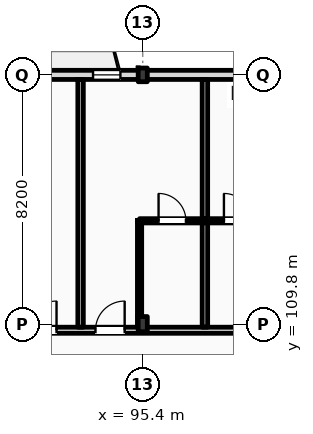
"""IFC4 building model, lengths in metres.
Left out: names, types, materials, properties, quantities, classifications, styles, units other than length and angle.
Written with IfcOpenShell. Run it as: python <this file> out.ifc"""

import sys

from ifc_helpers import new_model, si_unit, direction, frame, frame_2d, origin, origin_2d, place, context, subcontext, project, spatial, rectangle, i_section, extrude, element, fill, save


model = new_model("IFC4")
c1 = context("Model", 3, precision=1e-05, world=origin(), true_north=direction((0.0, 1.0)))
c2 = subcontext(c1, "Body", "Model", "MODEL_VIEW")
j1 = project(units=[si_unit("LENGTHUNIT", "METRE"), si_unit("PLANEANGLEUNIT", "RADIAN")], contexts=[c1])
p1 = place(None, origin())
s1 = spatial("IfcSite", under=j1, at=p1, CompositionType="ELEMENT")
p2 = place(p1, origin())
s2 = spatial("IfcBuilding", under=s1, at=p2, CompositionType="ELEMENT")
p3 = place(p2, frame((0.0, 0.0, 28.2)))
s3 = spatial("IfcBuildingStorey", under=s2, at=p3, CompositionType="ELEMENT", Elevation=28.2)
p4 = place(p3, frame((95.4, 109.8, 0.0), z_axis=(0.0, 0.0, 1.0), x_axis=(1.0, 0.0, 0.0)))
e1 = element("IfcColumn", 1, at=p4, inside=s3, PredefinedType="COLUMN", context=c2, shape_type="SweptSolid", body=[
    extrude(i_section(OverallWidth=0.3, OverallDepth=0.5, WebThickness=0.014, FlangeThickness=0.028, FilletRadius=0.027, at=origin_2d()), origin(), (0.0, 0.0, 1.0), 3.6),
])
p5 = place(p3, frame((95.4, 118.0, 0.0), z_axis=(0.0, 0.0, 1.0), x_axis=(1.0, 0.0, 0.0)))
e2 = element("IfcColumn", 2, at=p5, inside=s3, PredefinedType="COLUMN", context=c2, shape_type="SweptSolid", body=[
    extrude(i_section(OverallWidth=0.3, OverallDepth=0.45, WebThickness=0.014, FlangeThickness=0.026, FilletRadius=0.027, at=origin_2d()), origin(), (0.0, 0.0, 1.0), 3.6),
])
p6 = place(p3, frame((22.5, 118.0, 0.0), z_axis=(0.0, 0.0, 1.0), x_axis=(1.0, 0.0, 0.0)))
e3 = element("IfcWall", 3, at=p6, inside=s3, PredefinedType="STANDARD", context=c2, shape_type="SweptSolid", body=[
    extrude(rectangle(XDim=97.5, YDim=0.3, at=frame_2d((48.75, 0.0))), origin(), (0.0, 0.0, 1.0), 2.8),
])
p7 = place(p6, frame((0.91, 0.0, 0.9)))
e4 = element("IfcOpeningElement", 4, at=p7, cuts=e3, PredefinedType="OPENING", context=c2, shape_type="SweptSolid", body=[
    extrude(rectangle(XDim=0.9, YDim=1.72, at=frame_2d((0.45, 0.86))), frame((0.0, 0.16, 0.0), z_axis=(0.0, -1.0, 0.0), x_axis=(1.0, 0.0, 0.0)), (0.0, 0.0, 1.0), 0.32),
])
p8 = place(p6, frame((6.561, 0.0, 0.0)))
e5 = element("IfcOpeningElement", 5, at=p8, cuts=e3, PredefinedType="OPENING", context=c2, shape_type="SweptSolid", body=[
    extrude(rectangle(XDim=1.2, YDim=2.25, at=frame_2d((0.6, 1.125))), frame((0.0, 0.16, 0.0), z_axis=(0.0, -1.0, 0.0), x_axis=(1.0, 0.0, 0.0)), (0.0, 0.0, 1.0), 0.32),
])
p9 = place(p6, frame((11.477, 0.0, 0.9)))
e6 = element("IfcOpeningElement", 6, at=p9, cuts=e3, PredefinedType="OPENING", context=c2, shape_type="SweptSolid", body=[
    extrude(rectangle(XDim=1.1, YDim=1.5, at=frame_2d((0.55, 0.75))), frame((0.0, 0.16, 0.0), z_axis=(0.0, -1.0, 0.0), x_axis=(1.0, 0.0, 0.0)), (0.0, 0.0, 1.0), 0.32),
])
p10 = place(p6, frame((15.194, 0.0, 0.9)))
e7 = element("IfcOpeningElement", 7, at=p10, cuts=e3, PredefinedType="OPENING", context=c2, shape_type="SweptSolid", body=[
    extrude(rectangle(XDim=1.25, YDim=1.6, at=frame_2d((0.625, 0.8))), frame((0.0, 0.16, 0.0), z_axis=(0.0, -1.0, 0.0), x_axis=(1.0, 0.0, 0.0)), (0.0, 0.0, 1.0), 0.32),
])
p11 = place(p6, frame((19.509, 0.0, 0.9)))
e8 = element("IfcOpeningElement", 8, at=p11, cuts=e3, PredefinedType="OPENING", context=c2, shape_type="SweptSolid", body=[
    extrude(rectangle(XDim=1.4, YDim=1.7, at=frame_2d((0.7, 0.85))), frame((0.0, 0.16, 0.0), z_axis=(0.0, -1.0, 0.0), x_axis=(1.0, 0.0, 0.0)), (0.0, 0.0, 1.0), 0.32),
])
p12 = place(p6, frame((23.258, 0.0, 0.0)))
e9 = element("IfcOpeningElement", 9, at=p12, cuts=e3, PredefinedType="OPENING", context=c2, shape_type="SweptSolid", body=[
    extrude(rectangle(XDim=1.2, YDim=2.25, at=frame_2d((0.6, 1.125))), frame((0.0, 0.16, 0.0), z_axis=(0.0, -1.0, 0.0), x_axis=(1.0, 0.0, 0.0)), (0.0, 0.0, 1.0), 0.32),
])
p13 = place(p6, frame((28.115, 0.0, 0.9)))
e10 = element("IfcOpeningElement", 10, at=p13, cuts=e3, PredefinedType="OPENING", context=c2, shape_type="SweptSolid", body=[
    extrude(rectangle(XDim=1.75, YDim=1.72, at=frame_2d((0.875, 0.86))), frame((0.0, 0.16, 0.0), z_axis=(0.0, -1.0, 0.0), x_axis=(1.0, 0.0, 0.0)), (0.0, 0.0, 1.0), 0.32),
])
p14 = place(p6, frame((31.582, 0.0, 0.9)))
e11 = element("IfcOpeningElement", 11, at=p14, cuts=e3, PredefinedType="OPENING", context=c2, shape_type="SweptSolid", body=[
    extrude(rectangle(XDim=1.35, YDim=1.72, at=frame_2d((0.675, 0.86))), frame((0.0, 0.16, 0.0), z_axis=(0.0, -1.0, 0.0), x_axis=(1.0, 0.0, 0.0)), (0.0, 0.0, 1.0), 0.32),
])
p15 = place(p6, frame((37.379, 0.0, 0.0)))
e12 = element("IfcOpeningElement", 12, at=p15, cuts=e3, PredefinedType="OPENING", context=c2, shape_type="SweptSolid", body=[
    extrude(rectangle(XDim=1.2, YDim=2.25, at=frame_2d((0.6, 1.125))), frame((0.0, 0.16, 0.0), z_axis=(0.0, -1.0, 0.0), x_axis=(1.0, 0.0, 0.0)), (0.0, 0.0, 1.0), 0.32),
])
p16 = place(p6, frame((42.663, 0.0, 0.9)))
e13 = element("IfcOpeningElement", 13, at=p16, cuts=e3, PredefinedType="OPENING", context=c2, shape_type="SweptSolid", body=[
    extrude(rectangle(XDim=1.35, YDim=1.72, at=frame_2d((0.675, 0.86))), frame((0.0, 0.16, 0.0), z_axis=(0.0, -1.0, 0.0), x_axis=(1.0, 0.0, 0.0)), (0.0, 0.0, 1.0), 0.32),
])
p17 = place(p6, frame((45.119, 0.0, 0.9)))
e14 = element("IfcOpeningElement", 14, at=p17, cuts=e3, PredefinedType="OPENING", context=c2, shape_type="SweptSolid", body=[
    extrude(rectangle(XDim=2.871, YDim=1.72, at=frame_2d((1.436, 0.86))), frame((0.0, 0.16, 0.0), z_axis=(0.0, -1.0, 0.0), x_axis=(1.0, 0.0, 0.0)), (0.0, 0.0, 1.0), 0.32),
])
p18 = place(p6, frame((50.41, 0.0, 0.9)))
e15 = element("IfcOpeningElement", 15, at=p18, cuts=e3, PredefinedType="OPENING", context=c2, shape_type="SweptSolid", body=[
    extrude(rectangle(XDim=1.8, YDim=1.72, at=frame_2d((0.9, 0.86))), frame((0.0, 0.16, 0.0), z_axis=(0.0, -1.0, 0.0), x_axis=(1.0, 0.0, 0.0)), (0.0, 0.0, 1.0), 0.32),
])
p19 = place(p6, frame((54.375, 0.0, 0.0)))
e16 = element("IfcOpeningElement", 16, at=p19, cuts=e3, PredefinedType="OPENING", context=c2, shape_type="SweptSolid", body=[
    extrude(rectangle(XDim=1.2, YDim=2.25, at=frame_2d((0.6, 1.125))), frame((0.0, 0.16, 0.0), z_axis=(0.0, -1.0, 0.0), x_axis=(1.0, 0.0, 0.0)), (0.0, 0.0, 1.0), 0.32),
])
p20 = place(p6, frame((59.052, 0.0, 0.9)))
e17 = element("IfcOpeningElement", 17, at=p20, cuts=e3, PredefinedType="OPENING", context=c2, shape_type="SweptSolid", body=[
    extrude(rectangle(XDim=1.35, YDim=1.72, at=frame_2d((0.675, 0.86))), frame((0.0, 0.16, 0.0), z_axis=(0.0, -1.0, 0.0), x_axis=(1.0, 0.0, 0.0)), (0.0, 0.0, 1.0), 0.32),
])
p21 = place(p6, frame((62.768, 0.0, 0.9)))
e18 = element("IfcOpeningElement", 18, at=p21, cuts=e3, PredefinedType="OPENING", context=c2, shape_type="SweptSolid", body=[
    extrude(rectangle(XDim=1.5, YDim=1.72, at=frame_2d((0.75, 0.86))), frame((0.0, 0.16, 0.0), z_axis=(0.0, -1.0, 0.0), x_axis=(1.0, 0.0, 0.0)), (0.0, 0.0, 1.0), 0.32),
])
p22 = place(p6, frame((68.498, 0.0, 0.0)))
e19 = element("IfcOpeningElement", 19, at=p22, cuts=e3, PredefinedType="OPENING", context=c2, shape_type="SweptSolid", body=[
    extrude(rectangle(XDim=1.2, YDim=2.25, at=frame_2d((0.6, 1.125))), frame((0.0, 0.16, 0.0), z_axis=(0.0, -1.0, 0.0), x_axis=(1.0, 0.0, 0.0)), (0.0, 0.0, 1.0), 0.32),
])
p23 = place(p6, frame((71.265, 0.0, 0.9)))
e20 = element("IfcOpeningElement", 20, at=p23, cuts=e3, PredefinedType="OPENING", context=c2, shape_type="SweptSolid", body=[
    extrude(rectangle(XDim=0.9, YDim=1.72, at=frame_2d((0.45, 0.86))), frame((0.0, 0.16, 0.0), z_axis=(0.0, -1.0, 0.0), x_axis=(1.0, 0.0, 0.0)), (0.0, 0.0, 1.0), 0.32),
])
p24 = place(p6, frame((76.316, 0.0, 0.9)))
e21 = element("IfcOpeningElement", 21, at=p24, cuts=e3, PredefinedType="OPENING", context=c2, shape_type="SweptSolid", body=[
    extrude(rectangle(XDim=1.95, YDim=1.72, at=frame_2d((0.975, 0.86))), frame((0.0, 0.16, 0.0), z_axis=(0.0, -1.0, 0.0), x_axis=(1.0, 0.0, 0.0)), (0.0, 0.0, 1.0), 0.32),
])
p25 = place(p6, frame((81.632, 0.0, 0.9)))
e22 = element("IfcOpeningElement", 22, at=p25, cuts=e3, PredefinedType="OPENING", context=c2, shape_type="SweptSolid", body=[
    extrude(rectangle(XDim=1.35, YDim=1.72, at=frame_2d((0.675, 0.86))), frame((0.0, 0.16, 0.0), z_axis=(0.0, -1.0, 0.0), x_axis=(1.0, 0.0, 0.0)), (0.0, 0.0, 1.0), 0.32),
])
p26 = place(p6, frame((84.948, 0.0, 0.9)))
e23 = element("IfcOpeningElement", 23, at=p26, cuts=e3, PredefinedType="OPENING", context=c2, shape_type="SweptSolid", body=[
    extrude(rectangle(XDim=2.25, YDim=1.72, at=frame_2d((1.125, 0.86))), frame((0.0, 0.16, 0.0), z_axis=(0.0, -1.0, 0.0), x_axis=(1.0, 0.0, 0.0)), (0.0, 0.0, 1.0), 0.32),
])
p27 = place(p6, frame((90.063, 0.0, 0.9)))
e24 = element("IfcOpeningElement", 24, at=p27, cuts=e3, PredefinedType="OPENING", context=c2, shape_type="SweptSolid", body=[
    extrude(rectangle(XDim=1.8, YDim=1.72, at=frame_2d((0.9, 0.86))), frame((0.0, 0.16, 0.0), z_axis=(0.0, -1.0, 0.0), x_axis=(1.0, 0.0, 0.0)), (0.0, 0.0, 1.0), 0.32),
])
p28 = place(p6, frame((93.529, 0.0, 0.9)))
e25 = element("IfcOpeningElement", 25, at=p28, cuts=e3, PredefinedType="OPENING", context=c2, shape_type="SweptSolid", body=[
    extrude(rectangle(XDim=2.55, YDim=1.72, at=frame_2d((1.275, 0.86))), frame((0.0, 0.16, 0.0), z_axis=(0.0, -1.0, 0.0), x_axis=(1.0, 0.0, 0.0)), (0.0, 0.0, 1.0), 0.32),
])
p29 = place(p3, frame((10.65, 109.6, 0.0), z_axis=(0.0, 0.0, 1.0), x_axis=(1.0, 0.0, 0.0)))
e26 = element("IfcWall", 26, at=p29, inside=s3, PredefinedType="PARTITIONING", context=c2, shape_type="SweptSolid", body=[
    extrude(rectangle(XDim=109.21, YDim=0.2, at=frame_2d((54.605, 0.0))), origin(), (0.0, 0.0, 1.0), 2.8),
])
p30 = place(p29, frame((12.611, 0.0, 0.0)))
e27 = element("IfcOpeningElement", 27, at=p30, cuts=e26, PredefinedType="OPENING", context=c2, shape_type="SweptSolid", body=[
    extrude(rectangle(XDim=1.02, YDim=2.2, at=frame_2d((0.51, 1.1))), frame((0.0, 0.11, 0.0), z_axis=(0.0, -1.0, 0.0), x_axis=(1.0, 0.0, 0.0)), (0.0, 0.0, 1.0), 0.22),
])
p31 = place(p29, frame((19.451, 0.0, 0.0)))
e28 = element("IfcOpeningElement", 28, at=p31, cuts=e26, PredefinedType="OPENING", context=c2, shape_type="SweptSolid", body=[
    extrude(rectangle(XDim=1.02, YDim=2.2, at=frame_2d((0.51, 1.1))), frame((0.0, 0.11, 0.0), z_axis=(0.0, -1.0, 0.0), x_axis=(1.0, 0.0, 0.0)), (0.0, 0.0, 1.0), 0.22),
])
p32 = place(p29, frame((23.842, 0.0, 0.0)))
e29 = element("IfcOpeningElement", 29, at=p32, cuts=e26, PredefinedType="OPENING", context=c2, shape_type="SweptSolid", body=[
    extrude(rectangle(XDim=1.02, YDim=2.2, at=frame_2d((0.51, 1.1))), frame((0.0, 0.11, 0.0), z_axis=(0.0, -1.0, 0.0), x_axis=(1.0, 0.0, 0.0)), (0.0, 0.0, 1.0), 0.22),
])
p33 = place(p29, frame((26.084, 0.0, 0.0)))
e30 = element("IfcOpeningElement", 30, at=p33, cuts=e26, PredefinedType="OPENING", context=c2, shape_type="SweptSolid", body=[
    extrude(rectangle(XDim=1.02, YDim=2.2, at=frame_2d((0.51, 1.1))), frame((0.0, 0.11, 0.0), z_axis=(0.0, -1.0, 0.0), x_axis=(1.0, 0.0, 0.0)), (0.0, 0.0, 1.0), 0.22),
])
p34 = place(p29, frame((32.655, 0.0, 0.0)))
e31 = element("IfcOpeningElement", 31, at=p34, cuts=e26, PredefinedType="OPENING", context=c2, shape_type="SweptSolid", body=[
    extrude(rectangle(XDim=0.96, YDim=2.2, at=frame_2d((0.48, 1.1))), frame((0.0, 0.11, 0.0), z_axis=(0.0, -1.0, 0.0), x_axis=(1.0, 0.0, 0.0)), (0.0, 0.0, 1.0), 0.22),
])
p35 = place(p29, frame((34.895, 0.0, 0.0)))
e32 = element("IfcOpeningElement", 32, at=p35, cuts=e26, PredefinedType="OPENING", context=c2, shape_type="SweptSolid", body=[
    extrude(rectangle(XDim=0.96, YDim=2.2, at=frame_2d((0.48, 1.1))), frame((0.0, 0.11, 0.0), z_axis=(0.0, -1.0, 0.0), x_axis=(1.0, 0.0, 0.0)), (0.0, 0.0, 1.0), 0.22),
])
p36 = place(p29, frame((41.436, 0.0, 0.0)))
e33 = element("IfcOpeningElement", 33, at=p36, cuts=e26, PredefinedType="OPENING", context=c2, shape_type="SweptSolid", body=[
    extrude(rectangle(XDim=0.96, YDim=2.2, at=frame_2d((0.48, 1.1))), frame((0.0, 0.11, 0.0), z_axis=(0.0, -1.0, 0.0), x_axis=(1.0, 0.0, 0.0)), (0.0, 0.0, 1.0), 0.22),
])
p37 = place(p29, frame((43.427, 0.0, 0.0)))
e34 = element("IfcOpeningElement", 34, at=p37, cuts=e26, PredefinedType="OPENING", context=c2, shape_type="SweptSolid", body=[
    extrude(rectangle(XDim=0.96, YDim=2.2, at=frame_2d((0.48, 1.1))), frame((0.0, 0.11, 0.0), z_axis=(0.0, -1.0, 0.0), x_axis=(1.0, 0.0, 0.0)), (0.0, 0.0, 1.0), 0.22),
])
p38 = place(p29, frame((50.218, 0.0, 0.0)))
e35 = element("IfcOpeningElement", 35, at=p38, cuts=e26, PredefinedType="OPENING", context=c2, shape_type="SweptSolid", body=[
    extrude(rectangle(XDim=0.96, YDim=2.2, at=frame_2d((0.48, 1.1))), frame((0.0, 0.11, 0.0), z_axis=(0.0, -1.0, 0.0), x_axis=(1.0, 0.0, 0.0)), (0.0, 0.0, 1.0), 0.22),
])
p39 = place(p29, frame((54.859, 0.0, 0.0)))
e36 = element("IfcOpeningElement", 36, at=p39, cuts=e26, PredefinedType="OPENING", context=c2, shape_type="SweptSolid", body=[
    extrude(rectangle(XDim=0.96, YDim=2.2, at=frame_2d((0.48, 1.1))), frame((0.0, 0.11, 0.0), z_axis=(0.0, -1.0, 0.0), x_axis=(1.0, 0.0, 0.0)), (0.0, 0.0, 1.0), 0.22),
])
p40 = place(p29, frame((59.0, 0.0, 0.0)))
e37 = element("IfcOpeningElement", 37, at=p40, cuts=e26, PredefinedType="OPENING", context=c2, shape_type="SweptSolid", body=[
    extrude(rectangle(XDim=0.96, YDim=2.2, at=frame_2d((0.48, 1.1))), frame((0.0, 0.11, 0.0), z_axis=(0.0, -1.0, 0.0), x_axis=(1.0, 0.0, 0.0)), (0.0, 0.0, 1.0), 0.22),
])
p41 = place(p29, frame((63.39, 0.0, 0.0)))
e38 = element("IfcOpeningElement", 38, at=p41, cuts=e26, PredefinedType="OPENING", context=c2, shape_type="SweptSolid", body=[
    extrude(rectangle(XDim=0.96, YDim=2.2, at=frame_2d((0.48, 1.1))), frame((0.0, 0.11, 0.0), z_axis=(0.0, -1.0, 0.0), x_axis=(1.0, 0.0, 0.0)), (0.0, 0.0, 1.0), 0.22),
])
p42 = place(p29, frame((65.631, 0.0, 0.0)))
e39 = element("IfcOpeningElement", 39, at=p42, cuts=e26, PredefinedType="OPENING", context=c2, shape_type="SweptSolid", body=[
    extrude(rectangle(XDim=0.96, YDim=2.2, at=frame_2d((0.48, 1.1))), frame((0.0, 0.11, 0.0), z_axis=(0.0, -1.0, 0.0), x_axis=(1.0, 0.0, 0.0)), (0.0, 0.0, 1.0), 0.22),
])
p43 = place(p29, frame((72.172, 0.0, 0.0)))
e40 = element("IfcOpeningElement", 40, at=p43, cuts=e26, PredefinedType="OPENING", context=c2, shape_type="SweptSolid", body=[
    extrude(rectangle(XDim=0.96, YDim=2.2, at=frame_2d((0.48, 1.1))), frame((0.0, 0.11, 0.0), z_axis=(0.0, -1.0, 0.0), x_axis=(1.0, 0.0, 0.0)), (0.0, 0.0, 1.0), 0.22),
])
p44 = place(p29, frame((74.413, 0.0, 0.0)))
e41 = element("IfcOpeningElement", 41, at=p44, cuts=e26, PredefinedType="OPENING", context=c2, shape_type="SweptSolid", body=[
    extrude(rectangle(XDim=0.96, YDim=2.2, at=frame_2d((0.48, 1.1))), frame((0.0, 0.11, 0.0), z_axis=(0.0, -1.0, 0.0), x_axis=(1.0, 0.0, 0.0)), (0.0, 0.0, 1.0), 0.22),
])
p45 = place(p29, frame((80.954, 0.0, 0.0)))
e42 = element("IfcOpeningElement", 42, at=p45, cuts=e26, PredefinedType="OPENING", context=c2, shape_type="SweptSolid", body=[
    extrude(rectangle(XDim=0.96, YDim=2.2, at=frame_2d((0.48, 1.1))), frame((0.0, 0.11, 0.0), z_axis=(0.0, -1.0, 0.0), x_axis=(1.0, 0.0, 0.0)), (0.0, 0.0, 1.0), 0.22),
])
p46 = place(p29, frame((83.195, 0.0, 0.0)))
e43 = element("IfcOpeningElement", 43, at=p46, cuts=e26, PredefinedType="OPENING", context=c2, shape_type="SweptSolid", body=[
    extrude(rectangle(XDim=0.96, YDim=2.2, at=frame_2d((0.48, 1.1))), frame((0.0, 0.11, 0.0), z_axis=(0.0, -1.0, 0.0), x_axis=(1.0, 0.0, 0.0)), (0.0, 0.0, 1.0), 0.22),
])
p47 = place(p29, frame((89.735, 0.0, 0.0)))
e44 = element("IfcOpeningElement", 44, at=p47, cuts=e26, PredefinedType="OPENING", context=c2, shape_type="SweptSolid", body=[
    extrude(rectangle(XDim=0.96, YDim=2.2, at=frame_2d((0.48, 1.1))), frame((0.0, 0.11, 0.0), z_axis=(0.0, -1.0, 0.0), x_axis=(1.0, 0.0, 0.0)), (0.0, 0.0, 1.0), 0.22),
])
p48 = place(p29, frame((94.126, 0.0, 0.0)))
e45 = element("IfcOpeningElement", 45, at=p48, cuts=e26, PredefinedType="OPENING", context=c2, shape_type="SweptSolid", body=[
    extrude(rectangle(XDim=0.96, YDim=2.2, at=frame_2d((0.48, 1.1))), frame((0.0, 0.11, 0.0), z_axis=(0.0, -1.0, 0.0), x_axis=(1.0, 0.0, 0.0)), (0.0, 0.0, 1.0), 0.22),
])
p49 = place(p29, frame((98.517, 0.0, 0.0)))
e46 = element("IfcOpeningElement", 46, at=p49, cuts=e26, PredefinedType="OPENING", context=c2, shape_type="SweptSolid", body=[
    extrude(rectangle(XDim=0.96, YDim=2.2, at=frame_2d((0.48, 1.1))), frame((0.0, 0.11, 0.0), z_axis=(0.0, -1.0, 0.0), x_axis=(1.0, 0.0, 0.0)), (0.0, 0.0, 1.0), 0.22),
])
p50 = place(p29, frame((102.908, 0.0, 0.0)))
e47 = element("IfcOpeningElement", 47, at=p50, cuts=e26, PredefinedType="OPENING", context=c2, shape_type="SweptSolid", body=[
    extrude(rectangle(XDim=0.96, YDim=2.2, at=frame_2d((0.48, 1.1))), frame((0.0, 0.11, 0.0), z_axis=(0.0, -1.0, 0.0), x_axis=(1.0, 0.0, 0.0)), (0.0, 0.0, 1.0), 0.22),
])
p51 = place(p29, frame((105.099, 0.0, 0.0)))
e48 = element("IfcOpeningElement", 48, at=p51, cuts=e26, PredefinedType="OPENING", context=c2, shape_type="SweptSolid", body=[
    extrude(rectangle(XDim=0.96, YDim=2.2, at=frame_2d((0.48, 1.1))), frame((0.0, 0.11, 0.0), z_axis=(0.0, -1.0, 0.0), x_axis=(1.0, 0.0, 0.0)), (0.0, 0.0, 1.0), 0.22),
])
p52 = place(p29, frame((2.716, 0.0, 0.0)))
e49 = element("IfcOpeningElement", 49, at=p52, cuts=e26, PredefinedType="OPENING", context=c2, shape_type="SweptSolid", body=[
    extrude(rectangle(XDim=1.35, YDim=2.25, at=frame_2d((0.675, 1.125))), frame((0.0, 0.11, 0.0), z_axis=(0.0, -1.0, 0.0), x_axis=(1.0, 0.0, 0.0)), (0.0, 0.0, 1.0), 0.22),
])
p53 = place(p29, frame((6.65, 0.0, 0.0)))
e50 = element("IfcOpeningElement", 50, at=p53, cuts=e26, PredefinedType="OPENING", context=c2, shape_type="SweptSolid", body=[
    extrude(rectangle(XDim=1.35, YDim=2.25, at=frame_2d((0.675, 1.125))), frame((0.0, 0.11, 0.0), z_axis=(0.0, -1.0, 0.0), x_axis=(1.0, 0.0, 0.0)), (0.0, 0.0, 1.0), 0.22),
])
p54 = place(p29, frame((10.583, 0.0, 0.0)))
e51 = element("IfcOpeningElement", 51, at=p54, cuts=e26, PredefinedType="OPENING", context=c2, shape_type="SweptSolid", body=[
    extrude(rectangle(XDim=1.35, YDim=2.25, at=frame_2d((0.675, 1.125))), frame((0.0, 0.11, 0.0), z_axis=(0.0, -1.0, 0.0), x_axis=(1.0, 0.0, 0.0)), (0.0, 0.0, 1.0), 0.22),
])
for number, where, z_axis, x_axis in (
    (52, (93.355, 109.7, 0.0), (0.0, 0.0, 1.0), (0.0, 1.0, 0.0)),
    (53, (97.445, 109.7, 0.0), (0.0, 0.0, 1.0), (0.0, 1.0, 0.0)),
):
    element("IfcWall", number, at=place(p3, frame(where, z_axis=z_axis, x_axis=x_axis)), inside=s3, PredefinedType="PARTITIONING", context=c2, shape_type="SweptSolid", body=[
        extrude(rectangle(XDim=8.15, YDim=0.18, at=frame_2d((4.075, 0.0))), origin(), (0.0, 0.0, 1.0), 3.36),
    ])
p55 = place(p3, frame((95.295, 109.7, 0.0), z_axis=(0.0, 0.0, 1.0), x_axis=(0.0, 1.0, 0.0)))
e54 = element("IfcWall", 54, at=p55, inside=s3, PredefinedType="PARTITIONING", context=c2, shape_type="SweptSolid", body=[
    extrude(rectangle(XDim=3.5, YDim=0.14, at=frame_2d((1.75, 0.0))), origin(), (0.0, 0.0, 1.0), 2.99),
])
p56 = place(p3, frame((95.295, 113.2, 0.0), z_axis=(0.0, 0.0, 1.0), x_axis=(1.0, 0.0, 0.0)))
e55 = element("IfcWall", 55, at=p56, inside=s3, PredefinedType="PARTITIONING", context=c2, shape_type="SweptSolid", body=[
    extrude(rectangle(XDim=2.15, YDim=0.14, at=frame_2d((1.075, 0.0))), origin(), (0.0, 0.0, 1.0), 3.36),
])
p57 = place(p56, frame((0.625, 0.0, 0.0)))
e56 = element("IfcOpeningElement", 56, at=p57, cuts=e55, PredefinedType="OPENING", context=c2, shape_type="SweptSolid", body=[
    extrude(rectangle(XDim=0.9, YDim=2.1, at=frame_2d((0.45, 1.05))), frame((0.0, 0.08, 0.0), z_axis=(0.0, -1.0, 0.0), x_axis=(1.0, 0.0, 0.0)), (0.0, 0.0, 1.0), 0.16),
])
p58 = place(p3, frame((97.445, 113.2, 0.0), z_axis=(0.0, 0.0, 1.0), x_axis=(1.0, 0.0, 0.0)))
e57 = element("IfcWall", 57, at=p58, inside=s3, PredefinedType="PARTITIONING", context=c2, shape_type="SweptSolid", body=[
    extrude(rectangle(XDim=2.15, YDim=0.14, at=frame_2d((1.075, 0.0))), origin(), (0.0, 0.0, 1.0), 3.36),
])
p59 = place(p58, frame((0.625, 0.0, 0.0)))
e58 = element("IfcOpeningElement", 58, at=p59, cuts=e57, PredefinedType="OPENING", context=c2, shape_type="SweptSolid", body=[
    extrude(rectangle(XDim=0.9, YDim=2.1, at=frame_2d((0.45, 1.05))), frame((0.0, 0.08, 0.0), z_axis=(0.0, -1.0, 0.0), x_axis=(1.0, 0.0, 0.0)), (0.0, 0.0, 1.0), 0.16),
])
p60 = place(p23, origin())
e59 = element("IfcWindow", 59, at=p60, inside=s3, PartitioningType="DOUBLE_PANEL_VERTICAL", PredefinedType="WINDOW", context=c2, shape_type="SweptSolid", body=[
    extrude(rectangle(XDim=0.9, YDim=1.72, at=frame_2d((0.45, 0.86))), frame((0.0, 0.03, 0.0), z_axis=(0.0, -1.0, 0.0), x_axis=(1.0, 0.0, 0.0)), (0.0, 0.0, 1.0), 0.06),
])
fill(e20, e59)
p61 = place(p45, origin())
e60 = element("IfcDoor", 60, at=p61, inside=s3, OperationType="SINGLE_SWING_RIGHT", PredefinedType="DOOR", context=c2, shape_type="SweptSolid", body=[
    extrude(rectangle(XDim=0.96, YDim=2.2, at=frame_2d((0.48, 1.1))), frame((0.0, 0.025, 0.0), z_axis=(0.0, -1.0, 0.0), x_axis=(1.0, 0.0, 0.0)), (0.0, 0.0, 1.0), 0.05),
])
fill(e42, e60)
p62 = place(p46, origin())
e61 = element("IfcDoor", 61, at=p62, inside=s3, OperationType="SINGLE_SWING_RIGHT", PredefinedType="DOOR", context=c2, shape_type="SweptSolid", body=[
    extrude(rectangle(XDim=0.96, YDim=2.2, at=frame_2d((0.48, 1.1))), frame((0.0, 0.025, 0.0), z_axis=(0.0, -1.0, 0.0), x_axis=(1.0, 0.0, 0.0)), (0.0, 0.0, 1.0), 0.05),
])
fill(e43, e61)
p63 = place(p57, origin())
e62 = element("IfcDoor", 62, at=p63, inside=s3, OperationType="SINGLE_SWING_LEFT", PredefinedType="DOOR", context=c2, shape_type="SweptSolid", body=[
    extrude(rectangle(XDim=0.9, YDim=2.1, at=frame_2d((0.45, 1.05))), frame((0.0, 0.025, 0.0), z_axis=(0.0, -1.0, 0.0), x_axis=(1.0, 0.0, 0.0)), (0.0, 0.0, 1.0), 0.05),
])
fill(e56, e62)
p64 = place(p59, origin())
e63 = element("IfcDoor", 63, at=p64, inside=s3, OperationType="SINGLE_SWING_LEFT", PredefinedType="DOOR", context=c2, shape_type="SweptSolid", body=[
    extrude(rectangle(XDim=0.9, YDim=2.1, at=frame_2d((0.45, 1.05))), frame((0.0, 0.025, 0.0), z_axis=(0.0, -1.0, 0.0), x_axis=(1.0, 0.0, 0.0)), (0.0, 0.0, 1.0), 0.05),
])
fill(e58, e63)
save(model, sys.argv[1])
